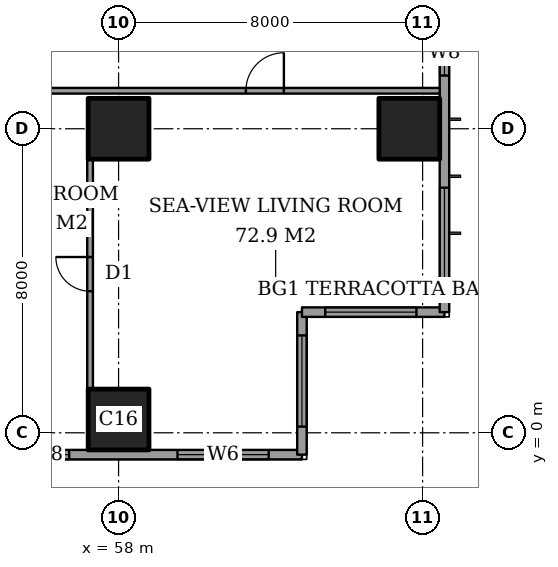
"""IFC4 building model, lengths in metres.
Left out: names, types, materials, properties, quantities, classifications, styles, units other than length and angle.
Written with IfcOpenShell. Run it as: python <this file> out.ifc"""

import sys

from ifc_helpers import new_model, si_unit, direction, frame, frame_2d, origin, origin_2d, place, context, subcontext, project, spatial, rectangle, extrude, element, fill, save


model = new_model("IFC4")
c1 = context("Model", 3, precision=1e-05, world=origin(), true_north=direction((0.0, 1.0)))
c2 = subcontext(c1, "Body", "Model", "MODEL_VIEW")
j1 = project(units=[si_unit("LENGTHUNIT", "METRE"), si_unit("PLANEANGLEUNIT", "RADIAN")], contexts=[c1])
p1 = place(None, origin())
s1 = spatial("IfcSite", under=j1, at=p1, CompositionType="ELEMENT")
p2 = place(p1, origin())
s2 = spatial("IfcBuilding", under=s1, at=p2, CompositionType="ELEMENT")
p3 = place(p2, frame((0.0, 0.0, 237.6)))
s3 = spatial("IfcBuildingStorey", under=s2, at=p3, CompositionType="ELEMENT", Elevation=237.6)
for number, where, z_axis, x_axis in (
    (1, (58.0, 0.35, 0.0), (0.0, 0.0, 1.0), (1.0, 0.0, 0.0)),
    (2, (58.0, 8.0, 0.0), (0.0, 0.0, 1.0), (1.0, 0.0, 0.0)),
    (3, (65.65, 8.0, 0.0), (0.0, 0.0, 1.0), (1.0, 0.0, 0.0)),
):
    element("IfcColumn", number, at=place(p3, frame(where, z_axis=z_axis, x_axis=x_axis)), inside=s3, PredefinedType="COLUMN", context=c2, shape_type="SweptSolid", body=[
        extrude(rectangle(XDim=1.6, YDim=1.6, at=origin_2d()), origin(), (0.0, 0.0, 1.0), 3.6),
    ])
p4 = place(p3, frame((41.425, -0.575, 0.0), z_axis=(0.0, 0.0, 1.0), x_axis=(1.0, 0.0, 0.0)))
e4 = element("IfcWall", 4, at=p4, inside=s3, PredefinedType="SOLIDWALL", context=c2, shape_type="SweptSolid", body=[
    extrude(rectangle(XDim=21.4, YDim=0.25, at=frame_2d((10.7, 0.0))), origin(), (0.0, 0.0, 1.0), 3.6),
])
p5 = place(p4, frame((2.65, 0.0, 0.6)))
e5 = element("IfcOpeningElement", 5, at=p5, cuts=e4, PredefinedType="OPENING", context=c2, shape_type="SweptSolid", body=[
    extrude(rectangle(XDim=1.2, YDim=2.0, at=frame_2d((0.6, 1.0))), frame((0.0, 0.135, 0.0), z_axis=(0.0, -1.0, 0.0), x_axis=(1.0, 0.0, 0.0)), (0.0, 0.0, 1.0), 0.27),
])
p6 = place(p4, frame((5.475, 0.0, 0.6)))
e6 = element("IfcOpeningElement", 6, at=p6, cuts=e4, PredefinedType="OPENING", context=c2, shape_type="SweptSolid", body=[
    extrude(rectangle(XDim=1.2, YDim=2.0, at=frame_2d((0.6, 1.0))), frame((0.0, 0.135, 0.0), z_axis=(0.0, -1.0, 0.0), x_axis=(1.0, 0.0, 0.0)), (0.0, 0.0, 1.0), 0.27),
])
p7 = place(p4, frame((10.275, 0.0, 0.6)))
e7 = element("IfcOpeningElement", 7, at=p7, cuts=e4, PredefinedType="OPENING", context=c2, shape_type="SweptSolid", body=[
    extrude(rectangle(XDim=2.4, YDim=2.0, at=frame_2d((1.2, 1.0))), frame((0.0, 0.135, 0.0), z_axis=(0.0, -1.0, 0.0), x_axis=(1.0, 0.0, 0.0)), (0.0, 0.0, 1.0), 0.27),
])
p8 = place(p4, frame((14.075, 0.0, 0.6)))
e8 = element("IfcOpeningElement", 8, at=p8, cuts=e4, PredefinedType="OPENING", context=c2, shape_type="SweptSolid", body=[
    extrude(rectangle(XDim=1.2, YDim=2.0, at=frame_2d((0.6, 1.0))), frame((0.0, 0.135, 0.0), z_axis=(0.0, -1.0, 0.0), x_axis=(1.0, 0.0, 0.0)), (0.0, 0.0, 1.0), 0.27),
])
p9 = place(p4, frame((18.125, 0.0, 0.6)))
e9 = element("IfcOpeningElement", 9, at=p9, cuts=e4, PredefinedType="OPENING", context=c2, shape_type="SweptSolid", body=[
    extrude(rectangle(XDim=2.4, YDim=2.0, at=frame_2d((1.2, 1.0))), frame((0.0, 0.135, 0.0), z_axis=(0.0, -1.0, 0.0), x_axis=(1.0, 0.0, 0.0)), (0.0, 0.0, 1.0), 0.27),
])
p10 = place(p3, frame((62.825, -0.575, 0.0), z_axis=(0.0, 0.0, 1.0), x_axis=(0.0, 1.0, 0.0)))
e10 = element("IfcWall", 10, at=p10, inside=s3, PredefinedType="SOLIDWALL", context=c2, shape_type="SweptSolid", body=[
    extrude(rectangle(XDim=3.75, YDim=0.25, at=frame_2d((1.875, 0.0))), origin(), (0.0, 0.0, 1.0), 3.6),
])
p11 = place(p10, frame((0.738, 0.0, 0.6)))
e11 = element("IfcOpeningElement", 11, at=p11, cuts=e10, PredefinedType="OPENING", context=c2, shape_type="SweptSolid", body=[
    extrude(rectangle(XDim=2.4, YDim=2.0, at=frame_2d((1.2, 1.0))), frame((0.0, 0.135, 0.0), z_axis=(0.0, -1.0, 0.0), x_axis=(1.0, 0.0, 0.0)), (0.0, 0.0, 1.0), 0.27),
])
p12 = place(p3, frame((62.825, 3.175, 0.0), z_axis=(0.0, 0.0, 1.0), x_axis=(1.0, 0.0, 0.0)))
e12 = element("IfcWall", 12, at=p12, inside=s3, PredefinedType="SOLIDWALL", context=c2, shape_type="SweptSolid", body=[
    extrude(rectangle(XDim=3.75, YDim=0.25, at=frame_2d((1.875, 0.0))), origin(), (0.0, 0.0, 1.0), 3.6),
])
p13 = place(p12, frame((0.613, 0.0, 0.6)))
e13 = element("IfcOpeningElement", 13, at=p13, cuts=e12, PredefinedType="OPENING", context=c2, shape_type="SweptSolid", body=[
    extrude(rectangle(XDim=2.4, YDim=2.0, at=frame_2d((1.2, 1.0))), frame((0.0, 0.135, 0.0), z_axis=(0.0, -1.0, 0.0), x_axis=(1.0, 0.0, 0.0)), (0.0, 0.0, 1.0), 0.27),
])
p14 = place(p3, frame((66.575, 3.175, 0.0), z_axis=(0.0, 0.0, 1.0), x_axis=(0.0, 1.0, 0.0)))
e14 = element("IfcWall", 14, at=p14, inside=s3, PredefinedType="SOLIDWALL", context=c2, shape_type="SweptSolid", body=[
    extrude(rectangle(XDim=41.65, YDim=0.25, at=frame_2d((20.825, 0.0))), origin(), (0.0, 0.0, 1.0), 3.6),
])
p15 = place(p14, frame((0.875, 0.0, 0.6)))
e15 = element("IfcOpeningElement", 15, at=p15, cuts=e14, PredefinedType="OPENING", context=c2, shape_type="SweptSolid", body=[
    extrude(rectangle(XDim=2.4, YDim=2.0, at=frame_2d((1.2, 1.0))), frame((0.0, 0.135, 0.0), z_axis=(0.0, -1.0, 0.0), x_axis=(1.0, 0.0, 0.0)), (0.0, 0.0, 1.0), 0.27),
])
p16 = place(p14, frame((6.225, 0.0, 0.6)))
e16 = element("IfcOpeningElement", 16, at=p16, cuts=e14, PredefinedType="OPENING", context=c2, shape_type="SweptSolid", body=[
    extrude(rectangle(XDim=1.2, YDim=2.0, at=frame_2d((0.6, 1.0))), frame((0.0, 0.135, 0.0), z_axis=(0.0, -1.0, 0.0), x_axis=(1.0, 0.0, 0.0)), (0.0, 0.0, 1.0), 0.27),
])
p17 = place(p14, frame((8.725, 0.0, 0.6)))
e17 = element("IfcOpeningElement", 17, at=p17, cuts=e14, PredefinedType="OPENING", context=c2, shape_type="SweptSolid", body=[
    extrude(rectangle(XDim=2.4, YDim=2.0, at=frame_2d((1.2, 1.0))), frame((0.0, 0.135, 0.0), z_axis=(0.0, -1.0, 0.0), x_axis=(1.0, 0.0, 0.0)), (0.0, 0.0, 1.0), 0.27),
])
p18 = place(p14, frame((15.725, 0.0, 0.6)))
e18 = element("IfcOpeningElement", 18, at=p18, cuts=e14, PredefinedType="OPENING", context=c2, shape_type="SweptSolid", body=[
    extrude(rectangle(XDim=2.4, YDim=2.0, at=frame_2d((1.2, 1.0))), frame((0.0, 0.135, 0.0), z_axis=(0.0, -1.0, 0.0), x_axis=(1.0, 0.0, 0.0)), (0.0, 0.0, 1.0), 0.27),
])
p19 = place(p14, frame((23.525, 0.0, 0.6)))
e19 = element("IfcOpeningElement", 19, at=p19, cuts=e14, PredefinedType="OPENING", context=c2, shape_type="SweptSolid", body=[
    extrude(rectangle(XDim=2.4, YDim=2.0, at=frame_2d((1.2, 1.0))), frame((0.0, 0.135, 0.0), z_axis=(0.0, -1.0, 0.0), x_axis=(1.0, 0.0, 0.0)), (0.0, 0.0, 1.0), 0.27),
])
p20 = place(p14, frame((30.725, 0.0, 0.6)))
e20 = element("IfcOpeningElement", 20, at=p20, cuts=e14, PredefinedType="OPENING", context=c2, shape_type="SweptSolid", body=[
    extrude(rectangle(XDim=2.4, YDim=2.0, at=frame_2d((1.2, 1.0))), frame((0.0, 0.135, 0.0), z_axis=(0.0, -1.0, 0.0), x_axis=(1.0, 0.0, 0.0)), (0.0, 0.0, 1.0), 0.27),
])
p21 = place(p14, frame((34.525, 0.0, 0.6)))
e21 = element("IfcOpeningElement", 21, at=p21, cuts=e14, PredefinedType="OPENING", context=c2, shape_type="SweptSolid", body=[
    extrude(rectangle(XDim=1.2, YDim=2.0, at=frame_2d((0.6, 1.0))), frame((0.0, 0.135, 0.0), z_axis=(0.0, -1.0, 0.0), x_axis=(1.0, 0.0, 0.0)), (0.0, 0.0, 1.0), 0.27),
])
p22 = place(p14, frame((38.375, 0.0, 0.6)))
e22 = element("IfcOpeningElement", 22, at=p22, cuts=e14, PredefinedType="OPENING", context=c2, shape_type="SweptSolid", body=[
    extrude(rectangle(XDim=2.4, YDim=2.0, at=frame_2d((1.2, 1.0))), frame((0.0, 0.135, 0.0), z_axis=(0.0, -1.0, 0.0), x_axis=(1.0, 0.0, 0.0)), (0.0, 0.0, 1.0), 0.27),
])
p23 = place(p3, frame((51.2, 9.0, 0.0), z_axis=(0.0, 0.0, 1.0), x_axis=(1.0, 0.0, 0.0)))
e23 = element("IfcWall", 23, at=p23, inside=s3, PredefinedType="PARTITIONING", context=c2, shape_type="SweptSolid", body=[
    extrude(rectangle(XDim=15.25, YDim=0.15, at=frame_2d((7.625, 0.0))), origin(), (0.0, 0.0, 1.0), 3.35),
])
p24 = place(p23, frame((10.15, 0.0, 0.0)))
e24 = element("IfcOpeningElement", 24, at=p24, cuts=e23, PredefinedType="OPENING", context=c2, shape_type="SweptSolid", body=[
    extrude(rectangle(XDim=1.0, YDim=2.1, at=frame_2d((0.5, 1.05))), frame((0.0, 0.085, 0.0), z_axis=(0.0, -1.0, 0.0), x_axis=(1.0, 0.0, 0.0)), (0.0, 0.0, 1.0), 0.17),
])
p25 = place(p23, frame((1.4, 0.0, 0.0)))
e25 = element("IfcOpeningElement", 25, at=p25, cuts=e23, PredefinedType="OPENING", context=c2, shape_type="SweptSolid", body=[
    extrude(rectangle(XDim=1.0, YDim=2.1, at=frame_2d((0.5, 1.05))), frame((0.0, 0.085, 0.0), z_axis=(0.0, -1.0, 0.0), x_axis=(1.0, 0.0, 0.0)), (0.0, 0.0, 1.0), 0.17),
])
p26 = place(p3, frame((57.25, 1.15, 0.0), z_axis=(0.0, 0.0, 1.0), x_axis=(0.0, 1.0, 0.0)))
e26 = element("IfcWall", 26, at=p26, inside=s3, PredefinedType="PARTITIONING", context=c2, shape_type="SweptSolid", body=[
    extrude(rectangle(XDim=6.05, YDim=0.15, at=frame_2d((3.025, 0.0))), origin(), (0.0, 0.0, 1.0), 3.35),
])
p27 = place(p26, frame((2.575, 0.0, 0.0)))
e27 = element("IfcOpeningElement", 27, at=p27, cuts=e26, PredefinedType="OPENING", context=c2, shape_type="SweptSolid", body=[
    extrude(rectangle(XDim=0.9, YDim=2.1, at=frame_2d((0.45, 1.05))), frame((0.0, 0.085, 0.0), z_axis=(0.0, -1.0, 0.0), x_axis=(1.0, 0.0, 0.0)), (0.0, 0.0, 1.0), 0.17),
])
p28 = place(p8, origin())
e28 = element("IfcWindow", 28, at=p28, inside=s3, PartitioningType="SINGLE_PANEL", PredefinedType="WINDOW", context=c2, shape_type="SweptSolid", body=[
    extrude(rectangle(XDim=1.2, YDim=2.0, at=frame_2d((0.6, 1.0))), frame((0.0, 0.03, 0.0), z_axis=(0.0, -1.0, 0.0), x_axis=(1.0, 0.0, 0.0)), (0.0, 0.0, 1.0), 0.06),
])
fill(e8, e28)
p29 = place(p9, origin())
e29 = element("IfcWindow", 29, at=p29, inside=s3, PartitioningType="SINGLE_PANEL", PredefinedType="WINDOW", context=c2, shape_type="SweptSolid", body=[
    extrude(rectangle(XDim=2.4, YDim=2.0, at=frame_2d((1.2, 1.0))), frame((0.0, 0.03, 0.0), z_axis=(0.0, -1.0, 0.0), x_axis=(1.0, 0.0, 0.0)), (0.0, 0.0, 1.0), 0.06),
])
fill(e9, e29)
p30 = place(p11, origin())
e30 = element("IfcWindow", 30, at=p30, inside=s3, PartitioningType="SINGLE_PANEL", PredefinedType="WINDOW", context=c2, shape_type="SweptSolid", body=[
    extrude(rectangle(XDim=2.4, YDim=2.0, at=frame_2d((1.2, 1.0))), frame((0.0, 0.03, 0.0), z_axis=(0.0, -1.0, 0.0), x_axis=(1.0, 0.0, 0.0)), (0.0, 0.0, 1.0), 0.06),
])
fill(e11, e30)
p31 = place(p13, origin())
e31 = element("IfcWindow", 31, at=p31, inside=s3, PartitioningType="SINGLE_PANEL", PredefinedType="WINDOW", context=c2, shape_type="SweptSolid", body=[
    extrude(rectangle(XDim=2.4, YDim=2.0, at=frame_2d((1.2, 1.0))), frame((0.0, 0.03, 0.0), z_axis=(0.0, -1.0, 0.0), x_axis=(1.0, 0.0, 0.0)), (0.0, 0.0, 1.0), 0.06),
])
fill(e13, e31)
p32 = place(p15, origin())
e32 = element("IfcWindow", 32, at=p32, inside=s3, PartitioningType="SINGLE_PANEL", PredefinedType="WINDOW", context=c2, shape_type="SweptSolid", body=[
    extrude(rectangle(XDim=2.4, YDim=2.0, at=frame_2d((1.2, 1.0))), frame((0.0, 0.03, 0.0), z_axis=(0.0, -1.0, 0.0), x_axis=(1.0, 0.0, 0.0)), (0.0, 0.0, 1.0), 0.06),
])
fill(e15, e32)
p33 = place(p16, origin())
e33 = element("IfcWindow", 33, at=p33, inside=s3, PartitioningType="SINGLE_PANEL", PredefinedType="WINDOW", context=c2, shape_type="SweptSolid", body=[
    extrude(rectangle(XDim=1.2, YDim=2.0, at=frame_2d((0.6, 1.0))), frame((0.0, 0.03, 0.0), z_axis=(0.0, -1.0, 0.0), x_axis=(1.0, 0.0, 0.0)), (0.0, 0.0, 1.0), 0.06),
])
fill(e16, e33)
p34 = place(p24, origin())
e34 = element("IfcDoor", 34, at=p34, inside=s3, OperationType="SINGLE_SWING_LEFT", PredefinedType="DOOR", context=c2, shape_type="SweptSolid", body=[
    extrude(rectangle(XDim=1.0, YDim=2.1, at=frame_2d((0.5, 1.05))), frame((0.0, 0.025, 0.0), z_axis=(0.0, -1.0, 0.0), x_axis=(1.0, 0.0, 0.0)), (0.0, 0.0, 1.0), 0.05),
])
fill(e24, e34)
p35 = place(p27, origin())
e35 = element("IfcDoor", 35, at=p35, inside=s3, OperationType="SINGLE_SWING_LEFT", PredefinedType="DOOR", context=c2, shape_type="SweptSolid", body=[
    extrude(rectangle(XDim=0.9, YDim=2.1, at=frame_2d((0.45, 1.05))), frame((0.0, 0.025, 0.0), z_axis=(0.0, -1.0, 0.0), x_axis=(1.0, 0.0, 0.0)), (0.0, 0.0, 1.0), 0.05),
])
fill(e27, e35)
save(model, sys.argv[1])
